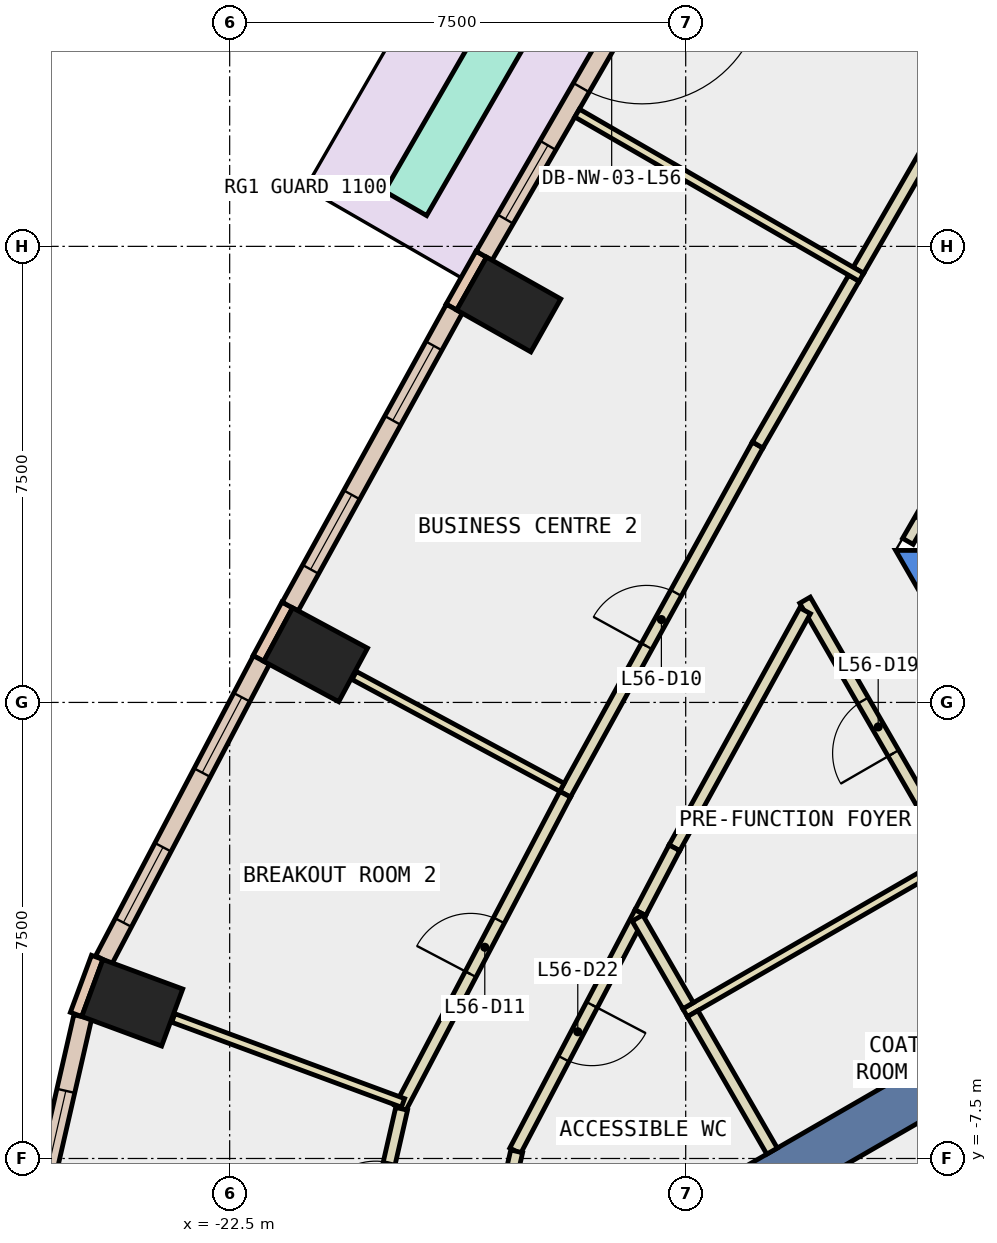
"""IFC4 building model, lengths in metres.
Left out: names, types, materials, properties, quantities, classifications, styles, units other than length and angle.
Written with IfcOpenShell. Run it as: python <this file> out.ifc"""

import sys

from ifc_helpers import new_model, si_unit, direction, frame, frame_2d, origin, origin_2d, place, context, subcontext, project, spatial, polyline, rectangle, outline, extrude, element, fill, save


model = new_model("IFC4")
c1 = context("Model", 3, precision=1e-05, world=origin(), true_north=direction((0.0, 1.0)))
c2 = subcontext(c1, "Body", "Model", "MODEL_VIEW")
j1 = project(units=[si_unit("LENGTHUNIT", "METRE"), si_unit("PLANEANGLEUNIT", "RADIAN")], contexts=[c1])
p1 = place(None, origin())
s1 = spatial("IfcSite", under=j1, at=p1, CompositionType="ELEMENT")
p2 = place(p1, origin())
s2 = spatial("IfcBuilding", under=s1, at=p2, CompositionType="ELEMENT")
p3 = place(p2, frame((0.0, 0.0, 248.6)))
s3 = spatial("IfcBuildingStorey", under=s2, at=p3, CompositionType="ELEMENT", Elevation=248.6)
for number, where, z_axis, x_axis in (
    (1, (-17.911, 6.544, -0.34), (0.0, 0.0, 1.0), (0.491, 0.871, 0.0)),
    (2, (-21.086, 0.784, -0.34), (0.0, 0.0, 1.0), (0.474, 0.881, 0.0)),
    (3, (-24.102, -4.939, -0.34), (0.0, 0.0, 1.0), (0.347, 0.938, 0.0)),
):
    element("IfcColumn", number, at=place(p3, frame(where, z_axis=z_axis, x_axis=x_axis)), inside=s3, PredefinedType="COLUMN", context=c2, shape_type="SweptSolid", body=[
        extrude(rectangle(XDim=1.0, YDim=1.4, at=origin_2d()), origin(), (0.0, 0.0, 1.0), 3.6),
    ])
p4 = place(p3, frame((0.0, 0.0, -0.34)))
e4 = element("IfcWall", 4, at=p4, inside=s3, PredefinedType="SHEAR", context=c2, shape_type="SweptSolid", body=[
    extrude(outline(polyline([(-11.547, 2.5), (-5.774, -7.5), (-5.427, -6.9), (-10.854, 2.5), (-11.547, 2.5)])), origin(), (0.0, 0.0, 1.0), 3.6),
])
p5 = place(p3, frame((-7.578, -4.375, -0.34), z_axis=(0.0, 0.0, 1.0), x_axis=(-0.866024315419, -0.5000018851, 0.0)))
e5 = element("IfcWall", 5, at=p5, inside=s3, PredefinedType="SHEAR", context=c2, shape_type="SweptSolid", body=[
    extrude(rectangle(XDim=9.0, YDim=0.8, at=frame_2d((4.5, 0.0))), origin(), (0.0, 0.0, 1.0), 3.6),
])
for number, where, z_axis, x_axis in (
    (6, (-18.362, 7.372, 0.0), (0.0, 0.0, 1.0), (-0.492, -0.871, 0.0)),
    (7, (-21.553, 1.604, 0.0), (0.0, 0.0, 1.0), (-0.474, -0.881, 0.0)),
):
    element("IfcWall", number, at=place(p3, frame(where, z_axis=z_axis, x_axis=x_axis)), inside=s3, PredefinedType="STANDARD", context=c2, shape_type="SweptSolid", body=[
        extrude(rectangle(XDim=1.0, YDim=0.2, at=frame_2d((0.5, 0.0))), origin(), (0.0, 0.0, 1.0), 3.26),
    ])
p6 = place(p3, frame((-24.679, -4.193, 0.0), z_axis=(0.0, 0.0, 1.0), x_axis=(-0.346892928577, -0.937904737222, 0.0)))
e8 = element("IfcWall", 8, at=p6, inside=s3, PredefinedType="STANDARD", context=c2, shape_type="SweptSolid", body=[
    extrude(rectangle(XDim=1.0, YDim=0.2, at=frame_2d((0.5, 0.0))), origin(), (0.0, 0.0, 1.0), 3.26),
])
p7 = place(p3, frame((-15.518, 12.189, 0.0), z_axis=(0.0, 0.0, 1.0), x_axis=(-0.49995037644, -0.866054052065, 0.0)))
e9 = element("IfcWall", 9, at=p7, inside=s3, PredefinedType="STANDARD", context=c2, shape_type="SweptSolid", body=[
    extrude(rectangle(XDim=5.594, YDim=0.3, at=frame_2d((2.797, 0.0))), origin(), (0.0, 0.0, 1.0), 3.26),
])
p8 = place(p7, frame((0.399, 0.0, 0.0)))
e10 = element("IfcOpeningElement", 10, at=p8, cuts=e9, PredefinedType="OPENING", context=c2, shape_type="SweptSolid", body=[
    extrude(rectangle(XDim=2.0, YDim=2.4, at=frame_2d((1.0, 1.2))), frame((0.0, 0.16, 0.0), z_axis=(0.0, -1.0, 0.0), x_axis=(1.0, 0.0, 0.0)), (0.0, 0.0, 1.0), 0.32),
])
p9 = place(p7, frame((3.496, 0.0, 0.9)))
e11 = element("IfcOpeningElement", 11, at=p9, cuts=e9, PredefinedType="OPENING", context=c2, shape_type="SweptSolid", body=[
    extrude(rectangle(XDim=1.4, YDim=2.0, at=frame_2d((0.7, 1.0))), frame((0.0, 0.16, 0.0), z_axis=(0.0, -1.0, 0.0), x_axis=(1.0, 0.0, 0.0)), (0.0, 0.0, 1.0), 0.32),
])
p10 = place(p3, frame((-18.805, 6.475, 0.0), z_axis=(0.0, 0.0, 1.0), x_axis=(-0.482734585173, -0.875766704253, 0.0)))
e12 = element("IfcWall", 12, at=p10, inside=s3, PredefinedType="STANDARD", context=c2, shape_type="SweptSolid", body=[
    extrude(rectangle(XDim=5.593, YDim=0.3, at=frame_2d((2.796, 0.0))), origin(), (0.0, 0.0, 1.0), 3.26),
])
p11 = place(p10, frame((0.698, 0.0, 0.9)))
e13 = element("IfcOpeningElement", 13, at=p11, cuts=e12, PredefinedType="OPENING", context=c2, shape_type="SweptSolid", body=[
    extrude(rectangle(XDim=1.4, YDim=2.0, at=frame_2d((0.7, 1.0))), frame((0.0, 0.16, 0.0), z_axis=(0.0, -1.0, 0.0), x_axis=(1.0, 0.0, 0.0)), (0.0, 0.0, 1.0), 0.32),
])
p12 = place(p10, frame((3.495, 0.0, 0.9)))
e14 = element("IfcOpeningElement", 14, at=p12, cuts=e12, PredefinedType="OPENING", context=c2, shape_type="SweptSolid", body=[
    extrude(rectangle(XDim=1.4, YDim=2.0, at=frame_2d((0.7, 1.0))), frame((0.0, 0.16, 0.0), z_axis=(0.0, -1.0, 0.0), x_axis=(1.0, 0.0, 0.0)), (0.0, 0.0, 1.0), 0.32),
])
p13 = place(p3, frame((-21.978, 0.698, 0.0), z_axis=(0.0, 0.0, 1.0), x_axis=(-0.465228032148, -0.885190871001, 0.0)))
e15 = element("IfcWall", 15, at=p13, inside=s3, PredefinedType="STANDARD", context=c2, shape_type="SweptSolid", body=[
    extrude(rectangle(XDim=5.572, YDim=0.3, at=frame_2d((2.786, 0.0))), origin(), (0.0, 0.0, 1.0), 3.26),
])
p14 = place(p13, frame((0.693, 0.0, 0.9)))
e16 = element("IfcOpeningElement", 16, at=p14, cuts=e15, PredefinedType="OPENING", context=c2, shape_type="SweptSolid", body=[
    extrude(rectangle(XDim=1.4, YDim=2.0, at=frame_2d((0.7, 1.0))), frame((0.0, 0.16, 0.0), z_axis=(0.0, -1.0, 0.0), x_axis=(1.0, 0.0, 0.0)), (0.0, 0.0, 1.0), 0.32),
])
p15 = place(p13, frame((3.479, 0.0, 0.9)))
e17 = element("IfcOpeningElement", 17, at=p15, cuts=e15, PredefinedType="OPENING", context=c2, shape_type="SweptSolid", body=[
    extrude(rectangle(XDim=1.4, YDim=2.0, at=frame_2d((0.7, 1.0))), frame((0.0, 0.16, 0.0), z_axis=(0.0, -1.0, 0.0), x_axis=(1.0, 0.0, 0.0)), (0.0, 0.0, 1.0), 0.32),
])
p16 = place(p3, frame((-24.916, -5.17, 0.0), z_axis=(0.0, 0.0, 1.0), x_axis=(-0.222901327396, -0.974841011778, 0.0)))
e18 = element("IfcWall", 18, at=p16, inside=s3, PredefinedType="STANDARD", context=c2, shape_type="SweptSolid", body=[
    extrude(rectangle(XDim=3.898, YDim=0.3, at=frame_2d((1.949, 0.0))), origin(), (0.0, 0.0, 1.0), 3.26),
])
p17 = place(p16, frame((1.249, 0.0, 0.9)))
e19 = element("IfcOpeningElement", 19, at=p17, cuts=e18, PredefinedType="OPENING", context=c2, shape_type="SweptSolid", body=[
    extrude(rectangle(XDim=1.4, YDim=2.0, at=frame_2d((0.7, 1.0))), frame((0.0, 0.16, 0.0), z_axis=(0.0, -1.0, 0.0), x_axis=(1.0, 0.0, 0.0)), (0.0, 0.0, 1.0), 0.32),
])
p18 = place(p3, frame((-16.91, 12.877, 0.0), z_axis=(0.0, 0.0, 1.0), x_axis=(-0.500038519147, -0.866003163602, 0.0)))
e20 = element("IfcWall", 20, at=p18, inside=s3, PredefinedType="STANDARD", context=c2, shape_type="SweptSolid", body=[
    extrude(rectangle(XDim=5.394, YDim=0.8, at=frame_2d((2.697, 0.0))), origin(), (0.0, 0.0, 1.0), 0.8),
])
p19 = place(p3, frame((-10.63, -2.488, 0.0), z_axis=(0.0, 0.0, 1.0), x_axis=(-0.500108649621, 0.865962665808, 0.0)))
e21 = element("IfcWall", 21, at=p19, inside=s3, PredefinedType="PARTITIONING", context=c2, shape_type="SweptSolid", body=[
    extrude(rectangle(XDim=4.815, YDim=0.2, at=frame_2d((2.408, 0.0))), origin(), (0.0, 0.0, 1.0), 3.26),
])
p20 = place(p19, frame((1.908, 0.0, 0.0)))
e22 = element("IfcOpeningElement", 22, at=p20, cuts=e21, PredefinedType="OPENING", context=c2, shape_type="SweptSolid", body=[
    extrude(rectangle(XDim=1.0, YDim=2.1, at=frame_2d((0.5, 1.05))), frame((0.0, 0.11, 0.0), z_axis=(0.0, -1.0, 0.0), x_axis=(1.0, 0.0, 0.0)), (0.0, 0.0, 1.0), 0.22),
])
p21 = place(p3, frame((-13.036, 1.508, 0.0), z_axis=(0.0, 0.0, 1.0), x_axis=(-0.482884552822, -0.87568402329, 0.0)))
e23 = element("IfcWall", 23, at=p21, inside=s3, PredefinedType="PARTITIONING", context=c2, shape_type="SweptSolid", body=[
    extrude(rectangle(XDim=4.453, YDim=0.2, at=frame_2d((2.226, 0.0))), origin(), (0.0, 0.0, 1.0), 3.26),
])
p22 = place(p3, frame((-15.186, -2.391, 0.0), z_axis=(0.0, 0.0, 1.0), x_axis=(-0.464794189951, -0.885418748948, 0.0)))
e24 = element("IfcWall", 24, at=p22, inside=s3, PredefinedType="PARTITIONING", context=c2, shape_type="SweptSolid", body=[
    extrude(rectangle(XDim=1.205, YDim=0.2, at=frame_2d((0.603, 0.0))), origin(), (0.0, 0.0, 1.0), 3.26),
])
p23 = place(p3, frame((-15.746, -3.458, 0.0), z_axis=(0.0, 0.0, 1.0), x_axis=(-0.465179971699, -0.885216128372, 0.0)))
e25 = element("IfcWall", 25, at=p23, inside=s3, PredefinedType="PARTITIONING", context=c2, shape_type="SweptSolid", body=[
    extrude(rectangle(XDim=4.424, YDim=0.2, at=frame_2d((2.212, 0.0))), origin(), (0.0, 0.0, 1.0), 3.26),
])
p24 = place(p23, frame((1.712, 0.0, 0.0)))
e26 = element("IfcOpeningElement", 26, at=p24, cuts=e25, PredefinedType="OPENING", context=c2, shape_type="SweptSolid", body=[
    extrude(rectangle(XDim=1.0, YDim=2.1, at=frame_2d((0.5, 1.05))), frame((0.0, 0.11, 0.0), z_axis=(0.0, -1.0, 0.0), x_axis=(1.0, 0.0, 0.0)), (0.0, 0.0, 1.0), 0.22),
])
p25 = place(p3, frame((-17.78, -7.383, 0.0), z_axis=(0.0, 0.0, 1.0), x_axis=(-0.222760041204, -0.974873306662, 0.0)))
e27 = element("IfcWall", 27, at=p25, inside=s3, PredefinedType="PARTITIONING", context=c2, shape_type="SweptSolid", body=[
    extrude(rectangle(XDim=2.047, YDim=0.2, at=frame_2d((1.024, 0.0))), origin(), (0.0, 0.0, 1.0), 3.26),
])
p26 = place(p3, frame((-12.159, 7.107, 0.0), z_axis=(0.0, 0.0, 1.0), x_axis=(0.499953838557, 0.866052053466, 0.0)))
e28 = element("IfcWall", 28, at=p26, inside=s3, PredefinedType="PARTITIONING", context=c2, shape_type="SweptSolid", body=[
    extrude(rectangle(XDim=3.166, YDim=0.2, at=frame_2d((1.583, 0.0))), origin(), (0.0, 0.0, 1.0), 3.26),
])
p27 = place(p3, frame((-16.983, -1.509, 0.0), z_axis=(0.0, 0.0, 1.0), x_axis=(0.482785999899, 0.875738361785, 0.0)))
e29 = element("IfcWall", 29, at=p27, inside=s3, PredefinedType="PARTITIONING", context=c2, shape_type="SweptSolid", body=[
    extrude(rectangle(XDim=6.558, YDim=0.2, at=frame_2d((3.279, 0.0))), origin(), (0.0, 0.0, 1.0), 3.26),
])
p28 = place(p27, frame((2.779, 0.0, 0.0)))
e30 = element("IfcOpeningElement", 30, at=p28, cuts=e29, PredefinedType="OPENING", context=c2, shape_type="SweptSolid", body=[
    extrude(rectangle(XDim=1.0, YDim=2.1, at=frame_2d((0.5, 1.05))), frame((0.0, 0.11, 0.0), z_axis=(0.0, -1.0, 0.0), x_axis=(1.0, 0.0, 0.0)), (0.0, 0.0, 1.0), 0.22),
])
p29 = place(p3, frame((-13.817, 4.234, 0.0), z_axis=(0.0, 0.0, 1.0), x_axis=(0.499820325382, 0.866129114125, 0.0)))
e31 = element("IfcWall", 31, at=p29, inside=s3, PredefinedType="PARTITIONING", context=c2, shape_type="SweptSolid", body=[
    extrude(rectangle(XDim=3.167, YDim=0.2, at=frame_2d((1.583, 0.0))), origin(), (0.0, 0.0, 1.0), 3.26),
])
p30 = place(p3, frame((-19.696, -6.675, 0.0), z_axis=(0.0, 0.0, 1.0), x_axis=(0.465165163774, 0.88522390976, 0.0)))
e32 = element("IfcWall", 32, at=p30, inside=s3, PredefinedType="PARTITIONING", context=c2, shape_type="SweptSolid", body=[
    extrude(rectangle(XDim=5.835, YDim=0.2, at=frame_2d((2.917, 0.0))), origin(), (0.0, 0.0, 1.0), 3.26),
])
p31 = place(p30, frame((2.492, 0.0, 0.0)))
e33 = element("IfcOpeningElement", 33, at=p31, cuts=e32, PredefinedType="OPENING", context=c2, shape_type="SweptSolid", body=[
    extrude(rectangle(XDim=1.0, YDim=2.1, at=frame_2d((0.5, 1.05))), frame((0.0, 0.11, 0.0), z_axis=(0.0, -1.0, 0.0), x_axis=(1.0, 0.0, 0.0)), (0.0, 0.0, 1.0), 0.22),
])
p32 = place(p3, frame((-20.299, -9.43, 0.0), z_axis=(0.0, 0.0, 1.0), x_axis=(0.222523624687, 0.974927298036, 0.0)))
e34 = element("IfcWall", 34, at=p32, inside=s3, PredefinedType="PARTITIONING", context=c2, shape_type="SweptSolid", body=[
    extrude(rectangle(XDim=2.817, YDim=0.2, at=frame_2d((1.409, 0.0))), origin(), (0.0, 0.0, 1.0), 3.26),
])
p33 = place(p32, frame((0.909, 0.0, 0.0)))
e35 = element("IfcOpeningElement", 35, at=p33, cuts=e34, PredefinedType="OPENING", context=c2, shape_type="SweptSolid", body=[
    extrude(rectangle(XDim=1.0, YDim=2.1, at=frame_2d((0.5, 1.05))), frame((0.0, 0.11, 0.0), z_axis=(0.0, -1.0, 0.0), x_axis=(1.0, 0.0, 0.0)), (0.0, 0.0, 1.0), 0.22),
])
p34 = place(p3, frame((-10.506, -2.503, 0.0), z_axis=(0.0, 0.0, 1.0), x_axis=(-0.866044872465, -0.49996627774, 0.0)))
e36 = element("IfcWall", 36, at=p34, inside=s3, PredefinedType="PARTITIONING", context=c2, shape_type="SweptSolid", body=[
    extrude(rectangle(XDim=5.2, YDim=0.15, at=frame_2d((2.6, 0.0))), origin(), (0.0, 0.0, 1.0), 3.26),
])
p35 = place(p3, frame((-14.96, -4.988, 0.0), z_axis=(0.0, 0.0, 1.0), x_axis=(-0.500175017317, 0.865924333907, 0.0)))
e37 = element("IfcWall", 37, at=p35, inside=s3, PredefinedType="PARTITIONING", context=c2, shape_type="SweptSolid", body=[
    extrude(rectangle(XDim=1.666, YDim=0.2, at=frame_2d((0.833, 0.0))), origin(), (0.0, 0.0, 1.0), 3.26),
])
p36 = place(p3, frame((-8.111, -6.651, 0.0), z_axis=(0.0, 0.0, 1.0), x_axis=(-0.865984471925, -0.50007088936, 0.0)))
e38 = element("IfcWall", 38, at=p36, inside=s3, PredefinedType="PARTITIONING", context=c2, shape_type="SweptSolid", body=[
    extrude(rectangle(XDim=5.176, YDim=0.15, at=frame_2d((2.588, 0.0))), origin(), (0.0, 0.0, 1.0), 3.26),
])
p37 = place(p3, frame((-13.58, -7.379, 0.0), z_axis=(0.0, 0.0, 1.0), x_axis=(-0.499870876044, 0.866099940701, 0.0)))
e39 = element("IfcWall", 39, at=p37, inside=s3, PredefinedType="PARTITIONING", context=c2, shape_type="SweptSolid", body=[
    extrude(rectangle(XDim=2.611, YDim=0.2, at=frame_2d((1.305, 0.0))), origin(), (0.0, 0.0, 1.0), 3.26),
])
p38 = place(p3, frame((-12.11, 6.992, 0.0), z_axis=(0.0, 0.0, 1.0), x_axis=(-0.865994316829, 0.50005384032, 0.0)))
e40 = element("IfcWall", 40, at=p38, inside=s3, PredefinedType="PARTITIONING", context=c2, shape_type="SweptSolid", body=[
    extrude(rectangle(XDim=5.399, YDim=0.15, at=frame_2d((2.7, 0.0))), origin(), (0.0, 0.0, 1.0), 3.26),
])
p39 = place(p3, frame((-17.035, -1.396, 0.0), z_axis=(0.0, 0.0, 1.0), x_axis=(-0.88055795398, 0.473938487234, 0.0)))
e41 = element("IfcWall", 41, at=p39, inside=s3, PredefinedType="PARTITIONING", context=c2, shape_type="SweptSolid", body=[
    extrude(rectangle(XDim=3.88, YDim=0.15, at=frame_2d((1.94, 0.0))), origin(), (0.0, 0.0, 1.0), 3.26),
])
p40 = place(p3, frame((-19.649, -6.586, 0.0), z_axis=(0.0, 0.0, 1.0), x_axis=(-0.937935790958, 0.346808956114, 0.0)))
e42 = element("IfcWall", 42, at=p40, inside=s3, PredefinedType="PARTITIONING", context=c2, shape_type="SweptSolid", body=[
    extrude(rectangle(XDim=4.028, YDim=0.15, at=frame_2d((2.014, 0.0))), origin(), (0.0, 0.0, 1.0), 3.26),
])
p41 = place(p3, frame((-10.449, 4.203, 0.0), z_axis=(0.0, 0.0, 1.0), x_axis=(-0.499914839587, -0.866074565589, 0.0)))
e43 = element("IfcWall", 43, at=p41, inside=s3, PredefinedType="PARTITIONING", context=c2, shape_type="SweptSolid", body=[
    extrude(rectangle(XDim=1.794, YDim=0.2, at=frame_2d((0.897, 0.0))), origin(), (0.0, 0.0, 1.0), 2.4),
])
p42 = place(p41, frame((0.397, 0.0, 0.0)))
e44 = element("IfcOpeningElement", 44, at=p42, cuts=e43, PredefinedType="OPENING", context=c2, shape_type="SweptSolid", body=[
    extrude(rectangle(XDim=1.0, YDim=2.1, at=frame_2d((0.5, 1.05))), frame((0.0, 0.11, 0.0), z_axis=(0.0, -1.0, 0.0), x_axis=(1.0, 0.0, 0.0)), (0.0, 0.0, 1.0), 0.22),
])
p43 = place(p8, origin())
e45 = element("IfcDoor", 45, at=p43, inside=s3, OperationType="SLIDING_TO_LEFT", PredefinedType="DOOR", context=c2, shape_type="SweptSolid", body=[
    extrude(rectangle(XDim=2.0, YDim=2.4, at=frame_2d((1.0, 1.2))), frame((0.0, 0.025, 0.0), z_axis=(0.0, -1.0, 0.0), x_axis=(1.0, 0.0, 0.0)), (0.0, 0.0, 1.0), 0.05),
])
fill(e10, e45)
p44 = place(p9, origin())
e46 = element("IfcWindow", 46, at=p44, inside=s3, PartitioningType="SINGLE_PANEL", PredefinedType="WINDOW", context=c2, shape_type="SweptSolid", body=[
    extrude(rectangle(XDim=1.4, YDim=2.0, at=frame_2d((0.7, 1.0))), frame((0.0, 0.03, 0.0), z_axis=(0.0, -1.0, 0.0), x_axis=(1.0, 0.0, 0.0)), (0.0, 0.0, 1.0), 0.06),
])
fill(e11, e46)
p45 = place(p11, origin())
e47 = element("IfcWindow", 47, at=p45, inside=s3, PartitioningType="SINGLE_PANEL", PredefinedType="WINDOW", context=c2, shape_type="SweptSolid", body=[
    extrude(rectangle(XDim=1.4, YDim=2.0, at=frame_2d((0.7, 1.0))), frame((0.0, 0.03, 0.0), z_axis=(0.0, -1.0, 0.0), x_axis=(1.0, 0.0, 0.0)), (0.0, 0.0, 1.0), 0.06),
])
fill(e13, e47)
p46 = place(p12, origin())
e48 = element("IfcWindow", 48, at=p46, inside=s3, PartitioningType="SINGLE_PANEL", PredefinedType="WINDOW", context=c2, shape_type="SweptSolid", body=[
    extrude(rectangle(XDim=1.4, YDim=2.0, at=frame_2d((0.7, 1.0))), frame((0.0, 0.03, 0.0), z_axis=(0.0, -1.0, 0.0), x_axis=(1.0, 0.0, 0.0)), (0.0, 0.0, 1.0), 0.06),
])
fill(e14, e48)
p47 = place(p14, origin())
e49 = element("IfcWindow", 49, at=p47, inside=s3, PartitioningType="SINGLE_PANEL", PredefinedType="WINDOW", context=c2, shape_type="SweptSolid", body=[
    extrude(rectangle(XDim=1.4, YDim=2.0, at=frame_2d((0.7, 1.0))), frame((0.0, 0.03, 0.0), z_axis=(0.0, -1.0, 0.0), x_axis=(1.0, 0.0, 0.0)), (0.0, 0.0, 1.0), 0.06),
])
fill(e16, e49)
p48 = place(p15, origin())
e50 = element("IfcWindow", 50, at=p48, inside=s3, PartitioningType="SINGLE_PANEL", PredefinedType="WINDOW", context=c2, shape_type="SweptSolid", body=[
    extrude(rectangle(XDim=1.4, YDim=2.0, at=frame_2d((0.7, 1.0))), frame((0.0, 0.03, 0.0), z_axis=(0.0, -1.0, 0.0), x_axis=(1.0, 0.0, 0.0)), (0.0, 0.0, 1.0), 0.06),
])
fill(e17, e50)
p49 = place(p17, origin())
e51 = element("IfcWindow", 51, at=p49, inside=s3, PartitioningType="SINGLE_PANEL", PredefinedType="WINDOW", context=c2, shape_type="SweptSolid", body=[
    extrude(rectangle(XDim=1.4, YDim=2.0, at=frame_2d((0.7, 1.0))), frame((0.0, 0.03, 0.0), z_axis=(0.0, -1.0, 0.0), x_axis=(1.0, 0.0, 0.0)), (0.0, 0.0, 1.0), 0.06),
])
fill(e19, e51)
p50 = place(p28, origin())
e52 = element("IfcDoor", 52, at=p50, inside=s3, OperationType="SINGLE_SWING_LEFT", PredefinedType="DOOR", context=c2, shape_type="SweptSolid", body=[
    extrude(rectangle(XDim=1.0, YDim=2.1, at=frame_2d((0.5, 1.05))), frame((0.0, 0.025, 0.0), z_axis=(0.0, -1.0, 0.0), x_axis=(1.0, 0.0, 0.0)), (0.0, 0.0, 1.0), 0.05),
])
fill(e30, e52)
p51 = place(p31, origin())
e53 = element("IfcDoor", 53, at=p51, inside=s3, OperationType="SINGLE_SWING_LEFT", PredefinedType="DOOR", context=c2, shape_type="SweptSolid", body=[
    extrude(rectangle(XDim=1.0, YDim=2.1, at=frame_2d((0.5, 1.05))), frame((0.0, 0.025, 0.0), z_axis=(0.0, -1.0, 0.0), x_axis=(1.0, 0.0, 0.0)), (0.0, 0.0, 1.0), 0.05),
])
fill(e33, e53)
p52 = place(p33, origin())
e54 = element("IfcDoor", 54, at=p52, inside=s3, OperationType="SINGLE_SWING_LEFT", PredefinedType="DOOR", context=c2, shape_type="SweptSolid", body=[
    extrude(rectangle(XDim=1.0, YDim=2.1, at=frame_2d((0.5, 1.05))), frame((0.0, 0.025, 0.0), z_axis=(0.0, -1.0, 0.0), x_axis=(1.0, 0.0, 0.0)), (0.0, 0.0, 1.0), 0.05),
])
fill(e35, e54)
p53 = place(p20, origin())
e55 = element("IfcDoor", 55, at=p53, inside=s3, OperationType="SINGLE_SWING_LEFT", PredefinedType="DOOR", context=c2, shape_type="SweptSolid", body=[
    extrude(rectangle(XDim=1.0, YDim=2.1, at=frame_2d((0.5, 1.05))), frame((0.0, 0.025, 0.0), z_axis=(0.0, -1.0, 0.0), x_axis=(1.0, 0.0, 0.0)), (0.0, 0.0, 1.0), 0.05),
])
fill(e22, e55)
p54 = place(p24, origin())
e56 = element("IfcDoor", 56, at=p54, inside=s3, OperationType="SINGLE_SWING_LEFT", PredefinedType="DOOR", context=c2, shape_type="SweptSolid", body=[
    extrude(rectangle(XDim=1.0, YDim=2.1, at=frame_2d((0.5, 1.05))), frame((0.0, 0.025, 0.0), z_axis=(0.0, -1.0, 0.0), x_axis=(1.0, 0.0, 0.0)), (0.0, 0.0, 1.0), 0.05),
])
fill(e26, e56)
save(model, sys.argv[1])
